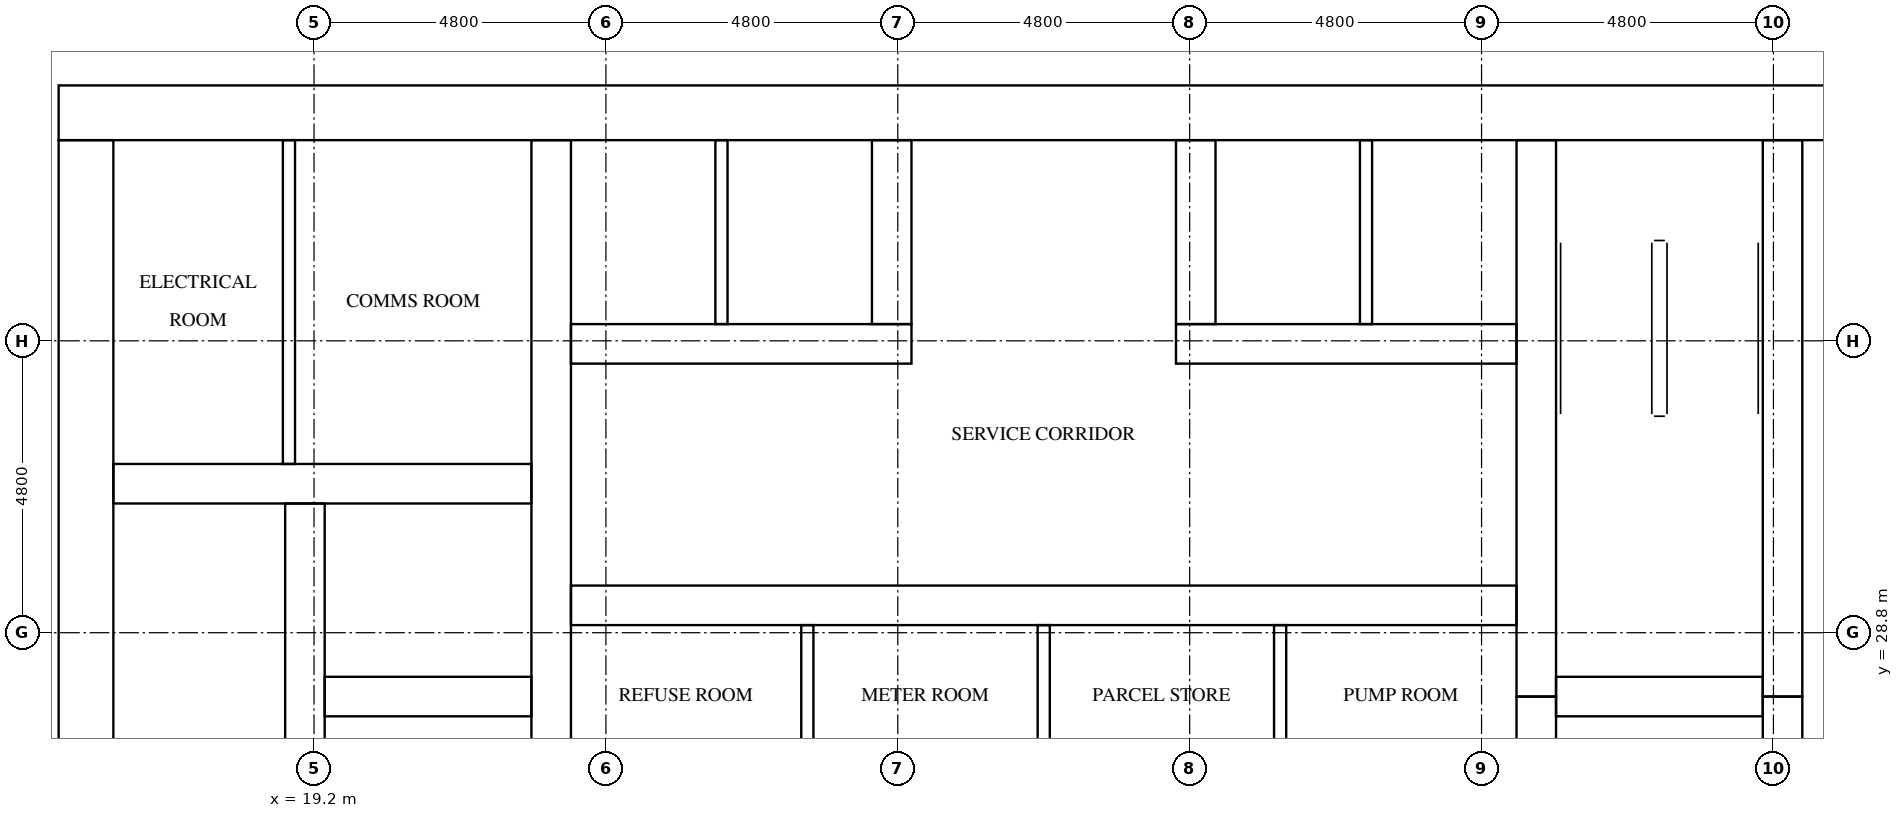
"""IFC4 building model, lengths in metres.
Left out: names, types, materials, properties, quantities, classifications, styles, units other than length and angle.
Written with IfcOpenShell. Run it as: python <this file> out.ifc"""

import sys

from ifc_helpers import new_model, si_unit, direction, frame, frame_2d, origin, place, context, subcontext, project, spatial, rectangle, extrude, element, fill, save


model = new_model("IFC4")
c1 = context("Model", 3, precision=1e-05, world=origin(), true_north=direction((0.0, 1.0)))
c2 = subcontext(c1, "Body", "Model", "MODEL_VIEW")
j1 = project(units=[si_unit("LENGTHUNIT", "METRE"), si_unit("PLANEANGLEUNIT", "RADIAN")], contexts=[c1])
p1 = place(None, origin())
s1 = spatial("IfcSite", under=j1, at=p1, CompositionType="ELEMENT")
p2 = place(p1, origin())
s2 = spatial("IfcBuilding", under=s1, at=p2, CompositionType="ELEMENT")
p3 = place(p2, frame((0.0, 0.0, 59.3)))
s3 = spatial("IfcBuildingStorey", under=s2, at=p3, CompositionType="ELEMENT", Elevation=59.3)
p4 = place(p3, frame((15.0, 37.35, 0.0), z_axis=(0.0, 0.0, 1.0), x_axis=(1.0, 0.0, 0.0)))
e1 = element("IfcWall", 1, at=p4, inside=s3, PredefinedType="SHEAR", context=c2, shape_type="SweptSolid", body=[
    extrude(rectangle(XDim=32.4, YDim=0.9, at=frame_2d((16.2, 0.0))), origin(), (0.0, 0.0, 1.0), 3.2),
])
p5 = place(p4, frame((15.3, 0.0, 0.0)))
e2 = element("IfcOpeningElement", 2, at=p5, cuts=e1, PredefinedType="OPENING", context=c2, shape_type="SweptSolid", body=[
    extrude(rectangle(XDim=1.8, YDim=2.1, at=frame_2d((0.9, 1.05))), frame((0.0, 0.46, 0.0), z_axis=(0.0, -1.0, 0.0), x_axis=(1.0, 0.0, 0.0)), (0.0, 0.0, 1.0), 0.92),
])
p6 = place(p4, frame((1.794, 0.0, 0.0)))
e3 = element("IfcOpeningElement", 3, at=p6, cuts=e1, PredefinedType="OPENING", context=c2, shape_type="SweptSolid", body=[
    extrude(rectangle(XDim=1.0, YDim=2.1, at=frame_2d((0.5, 1.05))), frame((0.0, 0.46, 0.0), z_axis=(0.0, -1.0, 0.0), x_axis=(1.0, 0.0, 0.0)), (0.0, 0.0, 1.0), 0.92),
])
p7 = place(p4, frame((5.331, 0.0, 0.0)))
e4 = element("IfcOpeningElement", 4, at=p7, cuts=e1, PredefinedType="OPENING", context=c2, shape_type="SweptSolid", body=[
    extrude(rectangle(XDim=1.0, YDim=2.1, at=frame_2d((0.5, 1.05))), frame((0.0, 0.46, 0.0), z_axis=(0.0, -1.0, 0.0), x_axis=(1.0, 0.0, 0.0)), (0.0, 0.0, 1.0), 0.92),
])
p8 = place(p3, frame((15.45, 15.9, 0.0), z_axis=(0.0, 0.0, 1.0), x_axis=(0.0, 1.0, 0.0)))
e5 = element("IfcWall", 5, at=p8, inside=s3, PredefinedType="SHEAR", context=c2, shape_type="SweptSolid", body=[
    extrude(rectangle(XDim=21.0, YDim=0.9, at=frame_2d((10.5, 0.0))), origin(), (0.0, 0.0, 1.0), 3.2),
])
p9 = place(p8, frame((4.86, 0.0, 0.0)))
e6 = element("IfcOpeningElement", 6, at=p9, cuts=e5, PredefinedType="OPENING", context=c2, shape_type="SweptSolid", body=[
    extrude(rectangle(XDim=1.2, YDim=2.1, at=frame_2d((0.6, 1.05))), frame((0.0, 0.46, 0.0), z_axis=(0.0, -1.0, 0.0), x_axis=(1.0, 0.0, 0.0)), (0.0, 0.0, 1.0), 0.92),
])
p10 = place(p3, frame((19.05, 15.9, 0.0), z_axis=(0.0, 0.0, 1.0), x_axis=(0.0, 1.0, 0.0)))
e7 = element("IfcWall", 7, at=p10, inside=s3, PredefinedType="SHEAR", context=c2, shape_type="SweptSolid", body=[
    extrude(rectangle(XDim=15.025, YDim=0.65, at=frame_2d((7.513, 0.0))), origin(), (0.0, 0.0, 1.0), 3.2),
])
p11 = place(p10, frame((9.55, 0.0, 0.0)))
e8 = element("IfcOpeningElement", 8, at=p11, cuts=e7, PredefinedType="OPENING", context=c2, shape_type="SweptSolid", body=[
    extrude(rectangle(XDim=1.1, YDim=2.1, at=frame_2d((0.55, 1.05))), frame((0.0, 0.335, 0.0), z_axis=(0.0, -1.0, 0.0), x_axis=(1.0, 0.0, 0.0)), (0.0, 0.0, 1.0), 0.67),
])
p12 = place(p10, frame((13.05, 0.0, 0.0)))
e9 = element("IfcOpeningElement", 9, at=p12, cuts=e7, PredefinedType="OPENING", context=c2, shape_type="SweptSolid", body=[
    extrude(rectangle(XDim=1.1, YDim=2.1, at=frame_2d((0.55, 1.05))), frame((0.0, 0.335, 0.0), z_axis=(0.0, -1.0, 0.0), x_axis=(1.0, 0.0, 0.0)), (0.0, 0.0, 1.0), 0.67),
])
p13 = place(p10, frame((0.3, 0.0, 0.0)))
e10 = element("IfcOpeningElement", 10, at=p13, cuts=e7, PredefinedType="OPENING", context=c2, shape_type="SweptSolid", body=[
    extrude(rectangle(XDim=1.2, YDim=2.1, at=frame_2d((0.6, 1.05))), frame((0.0, 0.335, 0.0), z_axis=(0.0, -1.0, 0.0), x_axis=(1.0, 0.0, 0.0)), (0.0, 0.0, 1.0), 0.67),
])
p14 = place(p3, frame((23.1, 15.9, 0.0), z_axis=(0.0, 0.0, 1.0), x_axis=(0.0, 1.0, 0.0)))
e11 = element("IfcWall", 11, at=p14, inside=s3, PredefinedType="SHEAR", context=c2, shape_type="SweptSolid", body=[
    extrude(rectangle(XDim=21.0, YDim=0.65, at=frame_2d((10.5, 0.0))), origin(), (0.0, 0.0, 1.0), 3.2),
])
p15 = place(p3, frame((39.3, 24.25, 0.0), z_axis=(0.0, 0.0, 1.0), x_axis=(0.0, 1.0, 0.0)))
e12 = element("IfcWall", 12, at=p15, inside=s3, PredefinedType="SHEAR", context=c2, shape_type="SweptSolid", body=[
    extrude(rectangle(XDim=3.5, YDim=0.65, at=frame_2d((1.75, 0.0))), origin(), (0.0, 0.0, 1.0), 3.2),
])
p16 = place(p3, frame((39.3, 27.75, 0.0), z_axis=(0.0, 0.0, 1.0), x_axis=(0.0, 1.0, 0.0)))
e13 = element("IfcWall", 13, at=p16, inside=s3, PredefinedType="SHEAR", context=c2, shape_type="SweptSolid", body=[
    extrude(rectangle(XDim=9.15, YDim=0.65, at=frame_2d((4.575, 0.0))), origin(), (0.0, 0.0, 1.0), 3.2),
])
p17 = place(p3, frame((43.35, 24.25, 0.0), z_axis=(0.0, 0.0, 1.0), x_axis=(0.0, 1.0, 0.0)))
e14 = element("IfcWall", 14, at=p17, inside=s3, PredefinedType="SHEAR", context=c2, shape_type="SweptSolid", body=[
    extrude(rectangle(XDim=3.5, YDim=0.65, at=frame_2d((1.75, 0.0))), origin(), (0.0, 0.0, 1.0), 3.2),
])
p18 = place(p17, frame((1.2, 0.0, 0.0)))
e15 = element("IfcOpeningElement", 15, at=p18, cuts=e14, PredefinedType="OPENING", context=c2, shape_type="SweptSolid", body=[
    extrude(rectangle(XDim=1.1, YDim=2.1, at=frame_2d((0.55, 1.05))), frame((0.0, 0.335, 0.0), z_axis=(0.0, -1.0, 0.0), x_axis=(1.0, 0.0, 0.0)), (0.0, 0.0, 1.0), 0.67),
])
p19 = place(p3, frame((43.35, 27.75, 0.0), z_axis=(0.0, 0.0, 1.0), x_axis=(0.0, 1.0, 0.0)))
e16 = element("IfcWall", 16, at=p19, inside=s3, PredefinedType="SHEAR", context=c2, shape_type="SweptSolid", body=[
    extrude(rectangle(XDim=9.15, YDim=0.65, at=frame_2d((4.575, 0.0))), origin(), (0.0, 0.0, 1.0), 3.2),
])
p20 = place(p19, frame((7.65, 0.0, 0.0)))
e17 = element("IfcOpeningElement", 17, at=p20, cuts=e16, PredefinedType="OPENING", context=c2, shape_type="SweptSolid", body=[
    extrude(rectangle(XDim=1.2, YDim=2.1, at=frame_2d((0.6, 1.05))), frame((0.0, 0.335, 0.0), z_axis=(0.0, -1.0, 0.0), x_axis=(1.0, 0.0, 0.0)), (0.0, 0.0, 1.0), 0.67),
])
p21 = place(p3, frame((19.375, 27.75, 0.0), z_axis=(0.0, 0.0, 1.0), x_axis=(1.0, 0.0, 0.0)))
e18 = element("IfcWall", 18, at=p21, inside=s3, PredefinedType="SHEAR", context=c2, shape_type="SweptSolid", body=[
    extrude(rectangle(XDim=3.4, YDim=0.65, at=frame_2d((1.7, 0.0))), origin(), (0.0, 0.0, 1.0), 3.2),
])
p22 = place(p3, frame((15.9, 31.25, 0.0), z_axis=(0.0, 0.0, 1.0), x_axis=(1.0, 0.0, 0.0)))
e19 = element("IfcWall", 19, at=p22, inside=s3, PredefinedType="SHEAR", context=c2, shape_type="SweptSolid", body=[
    extrude(rectangle(XDim=6.875, YDim=0.65, at=frame_2d((3.438, 0.0))), origin(), (0.0, 0.0, 1.0), 3.2),
])
p23 = place(p3, frame((39.625, 27.75, 0.0), z_axis=(0.0, 0.0, 1.0), x_axis=(1.0, 0.0, 0.0)))
e20 = element("IfcWall", 20, at=p23, inside=s3, PredefinedType="SHEAR", context=c2, shape_type="SweptSolid", body=[
    extrude(rectangle(XDim=3.4, YDim=0.65, at=frame_2d((1.7, 0.0))), origin(), (0.0, 0.0, 1.0), 3.2),
])
p24 = place(p3, frame((23.425, 29.25, 0.0), z_axis=(0.0, 0.0, 1.0), x_axis=(1.0, 0.0, 0.0)))
e21 = element("IfcWall", 21, at=p24, inside=s3, PredefinedType="SHEAR", context=c2, shape_type="SweptSolid", body=[
    extrude(rectangle(XDim=15.55, YDim=0.65, at=frame_2d((7.775, 0.0))), origin(), (0.0, 0.0, 1.0), 3.2),
])
p25 = place(p24, frame((1.394, 0.0, 0.0)))
e22 = element("IfcOpeningElement", 22, at=p25, cuts=e21, PredefinedType="OPENING", context=c2, shape_type="SweptSolid", body=[
    extrude(rectangle(XDim=1.0, YDim=2.1, at=frame_2d((0.5, 1.05))), frame((0.0, 0.335, 0.0), z_axis=(0.0, -1.0, 0.0), x_axis=(1.0, 0.0, 0.0)), (0.0, 0.0, 1.0), 0.67),
])
p26 = place(p24, frame((5.331, 0.0, 0.0)))
e23 = element("IfcOpeningElement", 23, at=p26, cuts=e21, PredefinedType="OPENING", context=c2, shape_type="SweptSolid", body=[
    extrude(rectangle(XDim=1.0, YDim=2.1, at=frame_2d((0.5, 1.05))), frame((0.0, 0.335, 0.0), z_axis=(0.0, -1.0, 0.0), x_axis=(1.0, 0.0, 0.0)), (0.0, 0.0, 1.0), 0.67),
])
p27 = place(p24, frame((9.219, 0.0, 0.0)))
e24 = element("IfcOpeningElement", 24, at=p27, cuts=e21, PredefinedType="OPENING", context=c2, shape_type="SweptSolid", body=[
    extrude(rectangle(XDim=1.0, YDim=2.1, at=frame_2d((0.5, 1.05))), frame((0.0, 0.335, 0.0), z_axis=(0.0, -1.0, 0.0), x_axis=(1.0, 0.0, 0.0)), (0.0, 0.0, 1.0), 0.67),
])
p28 = place(p24, frame((13.156, 0.0, 0.0)))
e25 = element("IfcOpeningElement", 25, at=p28, cuts=e21, PredefinedType="OPENING", context=c2, shape_type="SweptSolid", body=[
    extrude(rectangle(XDim=1.0, YDim=2.1, at=frame_2d((0.5, 1.05))), frame((0.0, 0.335, 0.0), z_axis=(0.0, -1.0, 0.0), x_axis=(1.0, 0.0, 0.0)), (0.0, 0.0, 1.0), 0.67),
])
p29 = place(p3, frame((23.425, 33.55, 0.0), z_axis=(0.0, 0.0, 1.0), x_axis=(1.0, 0.0, 0.0)))
e26 = element("IfcWall", 26, at=p29, inside=s3, PredefinedType="SHEAR", context=c2, shape_type="SweptSolid", body=[
    extrude(rectangle(XDim=5.6, YDim=0.65, at=frame_2d((2.8, 0.0))), origin(), (0.0, 0.0, 1.0), 3.2),
])
p30 = place(p3, frame((33.375, 33.55, 0.0), z_axis=(0.0, 0.0, 1.0), x_axis=(1.0, 0.0, 0.0)))
e27 = element("IfcWall", 27, at=p30, inside=s3, PredefinedType="SHEAR", context=c2, shape_type="SweptSolid", body=[
    extrude(rectangle(XDim=5.6, YDim=0.65, at=frame_2d((2.8, 0.0))), origin(), (0.0, 0.0, 1.0), 3.2),
])
for number, where, z_axis, x_axis in (
    (28, (28.7, 33.875, 0.0), (0.0, 0.0, 1.0), (0.0, 1.0, 0.0)),
    (29, (33.7, 33.875, 0.0), (0.0, 0.0, 1.0), (0.0, 1.0, 0.0)),
):
    element("IfcWall", number, at=place(p3, frame(where, z_axis=z_axis, x_axis=x_axis)), inside=s3, PredefinedType="SHEAR", context=c2, shape_type="SweptSolid", body=[
        extrude(rectangle(XDim=3.025, YDim=0.65, at=frame_2d((1.512, 0.0))), origin(), (0.0, 0.0, 1.0), 3.2),
    ])
for number, where, z_axis, x_axis in (
    (30, (25.9, 33.875, 0.0), (0.0, 0.0, 1.0), (0.0, 1.0, 0.0)),
    (31, (36.5, 33.875, 0.0), (0.0, 0.0, 1.0), (0.0, 1.0, 0.0)),
):
    element("IfcWall", number, at=place(p3, frame(where, z_axis=z_axis, x_axis=x_axis)), inside=s3, PredefinedType="SOLIDWALL", context=c2, shape_type="SweptSolid", body=[
        extrude(rectangle(XDim=3.025, YDim=0.2, at=frame_2d((1.512, 0.0))), origin(), (0.0, 0.0, 1.0), 3.2),
    ])
p31 = place(p3, frame((18.788, 31.575, 0.0), z_axis=(0.0, 0.0, 1.0), x_axis=(0.0, 1.0, 0.0)))
e32 = element("IfcWall", 32, at=p31, inside=s3, PredefinedType="PARTITIONING", context=c2, shape_type="SweptSolid", body=[
    extrude(rectangle(XDim=5.325, YDim=0.2, at=frame_2d((2.663, 0.0))), origin(), (0.0, 0.0, 1.0), 3.2),
])
for number, where, z_axis, x_axis in (
    (33, (27.312, 26.475, 0.0), (0.0, 0.0, 1.0), (0.0, 1.0, 0.0)),
    (34, (31.2, 26.475, 0.0), (0.0, 0.0, 1.0), (0.0, 1.0, 0.0)),
    (35, (35.087, 26.475, 0.0), (0.0, 0.0, 1.0), (0.0, 1.0, 0.0)),
):
    element("IfcWall", number, at=place(p3, frame(where, z_axis=z_axis, x_axis=x_axis)), inside=s3, PredefinedType="PARTITIONING", context=c2, shape_type="SweptSolid", body=[
        extrude(rectangle(XDim=2.45, YDim=0.2, at=frame_2d((1.225, 0.0))), origin(), (0.0, 0.0, 1.0), 3.2),
    ])
p32 = place(p12, origin())
e36 = element("IfcDoor", 36, at=p32, inside=s3, OperationType="DOUBLE_DOOR_SLIDING", PredefinedType="DOOR", context=c2, shape_type="SweptSolid", body=[
    extrude(rectangle(XDim=1.1, YDim=2.1, at=frame_2d((0.55, 1.05))), frame((0.0, 0.025, 0.0), z_axis=(0.0, -1.0, 0.0), x_axis=(1.0, 0.0, 0.0)), (0.0, 0.0, 1.0), 0.05),
])
fill(e9, e36)
p33 = place(p20, origin())
e37 = element("IfcDoor", 37, at=p33, inside=s3, OperationType="SINGLE_SWING_RIGHT", PredefinedType="DOOR", context=c2, shape_type="SweptSolid", body=[
    extrude(rectangle(XDim=1.2, YDim=2.1, at=frame_2d((0.6, 1.05))), frame((0.0, 0.025, 0.0), z_axis=(0.0, -1.0, 0.0), x_axis=(1.0, 0.0, 0.0)), (0.0, 0.0, 1.0), 0.05),
])
fill(e17, e37)
p34 = place(p5, origin())
e38 = element("IfcDoor", 38, at=p34, inside=s3, OperationType="DOUBLE_DOOR_SINGLE_SWING", PredefinedType="DOOR", context=c2, shape_type="SweptSolid", body=[
    extrude(rectangle(XDim=1.8, YDim=2.1, at=frame_2d((0.9, 1.05))), frame((0.0, 0.025, 0.0), z_axis=(0.0, -1.0, 0.0), x_axis=(1.0, 0.0, 0.0)), (0.0, 0.0, 1.0), 0.05),
])
fill(e2, e38)
p35 = place(p6, origin())
e39 = element("IfcDoor", 39, at=p35, inside=s3, OperationType="SINGLE_SWING_LEFT", PredefinedType="DOOR", context=c2, shape_type="SweptSolid", body=[
    extrude(rectangle(XDim=1.0, YDim=2.1, at=frame_2d((0.5, 1.05))), frame((0.0, 0.025, 0.0), z_axis=(0.0, -1.0, 0.0), x_axis=(1.0, 0.0, 0.0)), (0.0, 0.0, 1.0), 0.05),
])
fill(e3, e39)
p36 = place(p7, origin())
e40 = element("IfcDoor", 40, at=p36, inside=s3, OperationType="SINGLE_SWING_RIGHT", PredefinedType="DOOR", context=c2, shape_type="SweptSolid", body=[
    extrude(rectangle(XDim=1.0, YDim=2.1, at=frame_2d((0.5, 1.05))), frame((0.0, 0.025, 0.0), z_axis=(0.0, -1.0, 0.0), x_axis=(1.0, 0.0, 0.0)), (0.0, 0.0, 1.0), 0.05),
])
fill(e4, e40)
p37 = place(p25, origin())
e41 = element("IfcDoor", 41, at=p37, inside=s3, OperationType="SINGLE_SWING_LEFT", PredefinedType="DOOR", context=c2, shape_type="SweptSolid", body=[
    extrude(rectangle(XDim=1.0, YDim=2.1, at=frame_2d((0.5, 1.05))), frame((0.0, 0.025, 0.0), z_axis=(0.0, -1.0, 0.0), x_axis=(1.0, 0.0, 0.0)), (0.0, 0.0, 1.0), 0.05),
])
fill(e22, e41)
p38 = place(p26, origin())
e42 = element("IfcDoor", 42, at=p38, inside=s3, OperationType="SINGLE_SWING_RIGHT", PredefinedType="DOOR", context=c2, shape_type="SweptSolid", body=[
    extrude(rectangle(XDim=1.0, YDim=2.1, at=frame_2d((0.5, 1.05))), frame((0.0, 0.025, 0.0), z_axis=(0.0, -1.0, 0.0), x_axis=(1.0, 0.0, 0.0)), (0.0, 0.0, 1.0), 0.05),
])
fill(e23, e42)
p39 = place(p27, origin())
e43 = element("IfcDoor", 43, at=p39, inside=s3, OperationType="SINGLE_SWING_LEFT", PredefinedType="DOOR", context=c2, shape_type="SweptSolid", body=[
    extrude(rectangle(XDim=1.0, YDim=2.1, at=frame_2d((0.5, 1.05))), frame((0.0, 0.025, 0.0), z_axis=(0.0, -1.0, 0.0), x_axis=(1.0, 0.0, 0.0)), (0.0, 0.0, 1.0), 0.05),
])
fill(e24, e43)
p40 = place(p28, origin())
e44 = element("IfcDoor", 44, at=p40, inside=s3, OperationType="SINGLE_SWING_RIGHT", PredefinedType="DOOR", context=c2, shape_type="SweptSolid", body=[
    extrude(rectangle(XDim=1.0, YDim=2.1, at=frame_2d((0.5, 1.05))), frame((0.0, 0.025, 0.0), z_axis=(0.0, -1.0, 0.0), x_axis=(1.0, 0.0, 0.0)), (0.0, 0.0, 1.0), 0.05),
])
fill(e25, e44)
save(model, sys.argv[1])
